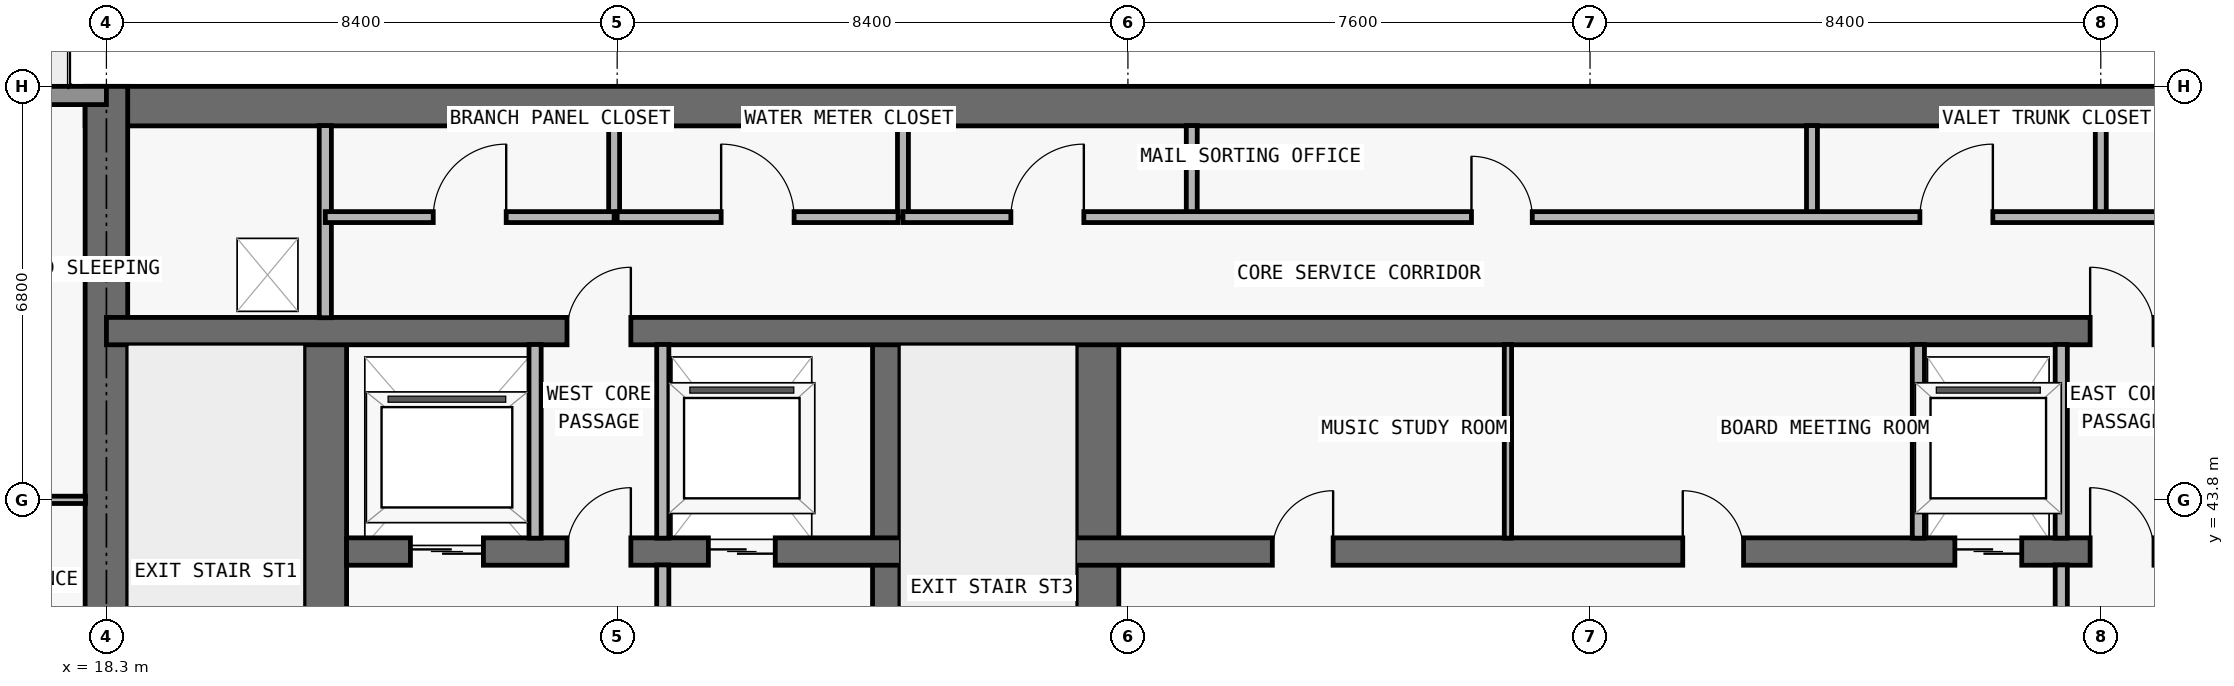
"""IFC4 building model, lengths in metres.
Left out: names, types, materials, properties, quantities, classifications, styles, units other than length and angle.
Written with IfcOpenShell. Run it as: python <this file> out.ifc"""

import sys

from ifc_helpers import new_model, si_unit, direction, frame, frame_2d, origin, place, context, subcontext, project, spatial, rectangle, extrude, element, fill, save


model = new_model("IFC4")
c1 = context("Model", 3, precision=1e-05, world=origin(), true_north=direction((0.0, 1.0)))
c2 = subcontext(c1, "Body", "Model", "MODEL_VIEW")
j1 = project(units=[si_unit("LENGTHUNIT", "METRE"), si_unit("PLANEANGLEUNIT", "RADIAN")], contexts=[c1])
p1 = place(None, origin())
s1 = spatial("IfcSite", under=j1, at=p1, CompositionType="ELEMENT")
p2 = place(p1, origin())
s2 = spatial("IfcBuilding", under=s1, at=p2, CompositionType="ELEMENT")
p3 = place(p2, frame((0.0, 0.0, 191.7)))
s3 = spatial("IfcBuildingStorey", under=s2, at=p3, CompositionType="ELEMENT", Elevation=191.7)
p4 = place(p3, frame((17.95, 50.275, 0.0), z_axis=(0.0, 0.0, 1.0), x_axis=(1.0, 0.0, 0.0)))
e1 = element("IfcWall", 1, at=p4, inside=s3, PredefinedType="SHEAR", context=c2, shape_type="SweptSolid", body=[
    extrude(rectangle(XDim=41.9, YDim=0.65, at=frame_2d((20.95, 0.0))), origin(), (0.0, 0.0, 1.0), 3.05),
])
p5 = place(p3, frame((18.3, 36.65, 0.0), z_axis=(0.0, 0.0, 1.0), x_axis=(0.0, 1.0, 0.0)))
e2 = element("IfcWall", 2, at=p5, inside=s3, PredefinedType="SHEAR", context=c2, shape_type="SweptSolid", body=[
    extrude(rectangle(XDim=13.95, YDim=0.7, at=frame_2d((6.975, 0.0))), origin(), (0.0, 0.0, 1.0), 3.05),
])
p6 = place(p3, frame((21.9, 37.0, 0.0), z_axis=(0.0, 0.0, 1.0), x_axis=(0.0, 1.0, 0.0)))
e3 = element("IfcWall", 3, at=p6, inside=s3, PredefinedType="SHEAR", context=c2, shape_type="SweptSolid", body=[
    extrude(rectangle(XDim=9.575, YDim=0.7, at=frame_2d((4.788, 0.0))), origin(), (0.0, 0.0, 1.0), 3.05),
])
p7 = place(p6, frame((0.55, 0.0, 0.0)))
e4 = element("IfcOpeningElement", 4, at=p7, cuts=e3, PredefinedType="OPENING", context=c2, shape_type="SweptSolid", body=[
    extrude(rectangle(XDim=1.1, YDim=2.15, at=frame_2d((0.55, 1.075))), frame((0.0, 0.36, 0.0), z_axis=(0.0, -1.0, 0.0), x_axis=(1.0, 0.0, 0.0)), (0.0, 0.0, 1.0), 0.72),
])
p8 = place(p3, frame((31.125, 37.0, 0.0), z_axis=(0.0, 0.0, 1.0), x_axis=(0.0, 1.0, 0.0)))
e5 = element("IfcWall", 5, at=p8, inside=s3, PredefinedType="SHEAR", context=c2, shape_type="SweptSolid", body=[
    extrude(rectangle(XDim=9.575, YDim=0.45, at=frame_2d((4.788, 0.0))), origin(), (0.0, 0.0, 1.0), 3.05),
])
p9 = place(p3, frame((34.6, 37.0, 0.0), z_axis=(0.0, 0.0, 1.0), x_axis=(0.0, 1.0, 0.0)))
e6 = element("IfcWall", 6, at=p9, inside=s3, PredefinedType="SHEAR", context=c2, shape_type="SweptSolid", body=[
    extrude(rectangle(XDim=9.575, YDim=0.7, at=frame_2d((4.788, 0.0))), origin(), (0.0, 0.0, 1.0), 3.05),
])
p10 = place(p3, frame((22.25, 42.95, 0.0), z_axis=(0.0, 0.0, 1.0), x_axis=(1.0, 0.0, 0.0)))
e7 = element("IfcWall", 7, at=p10, inside=s3, PredefinedType="SHEAR", context=c2, shape_type="SweptSolid", body=[
    extrude(rectangle(XDim=33.3, YDim=0.45, at=frame_2d((16.65, 0.0))), origin(), (0.0, 0.0, 1.0), 3.05),
])
p11 = place(p10, frame((1.05, 0.0, 0.0)))
e8 = element("IfcOpeningElement", 8, at=p11, cuts=e7, PredefinedType="OPENING", context=c2, shape_type="SweptSolid", body=[
    extrude(rectangle(XDim=1.2, YDim=2.2, at=frame_2d((0.6, 1.1))), frame((0.0, 0.235, 0.0), z_axis=(0.0, -1.0, 0.0), x_axis=(1.0, 0.0, 0.0)), (0.0, 0.0, 1.0), 0.47),
])
p12 = place(p10, frame((31.05, 0.0, 0.0)))
e9 = element("IfcOpeningElement", 9, at=p12, cuts=e7, PredefinedType="OPENING", context=c2, shape_type="SweptSolid", body=[
    extrude(rectangle(XDim=1.2, YDim=2.2, at=frame_2d((0.6, 1.1))), frame((0.0, 0.235, 0.0), z_axis=(0.0, -1.0, 0.0), x_axis=(1.0, 0.0, 0.0)), (0.0, 0.0, 1.0), 0.47),
])
p13 = place(p10, frame((26.45, 0.0, 0.0)))
e10 = element("IfcOpeningElement", 10, at=p13, cuts=e7, PredefinedType="OPENING", context=c2, shape_type="SweptSolid", body=[
    extrude(rectangle(XDim=1.1, YDim=2.2, at=frame_2d((0.55, 1.1))), frame((0.0, 0.235, 0.0), z_axis=(0.0, -1.0, 0.0), x_axis=(1.0, 0.0, 0.0)), (0.0, 0.0, 1.0), 0.47),
])
p14 = place(p10, frame((5.95, 0.0, 0.0)))
e11 = element("IfcOpeningElement", 11, at=p14, cuts=e7, PredefinedType="OPENING", context=c2, shape_type="SweptSolid", body=[
    extrude(rectangle(XDim=1.1, YDim=2.2, at=frame_2d((0.55, 1.1))), frame((0.0, 0.235, 0.0), z_axis=(0.0, -1.0, 0.0), x_axis=(1.0, 0.0, 0.0)), (0.0, 0.0, 1.0), 0.47),
])
p15 = place(p10, frame((3.625, 0.0, 0.0)))
e12 = element("IfcOpeningElement", 12, at=p15, cuts=e7, PredefinedType="OPENING", context=c2, shape_type="SweptSolid", body=[
    extrude(rectangle(XDim=1.05, YDim=2.15, at=frame_2d((0.525, 1.075))), frame((0.0, 0.235, 0.0), z_axis=(0.0, -1.0, 0.0), x_axis=(1.0, 0.0, 0.0)), (0.0, 0.0, 1.0), 0.47),
])
p16 = place(p10, frame((28.675, 0.0, 0.0)))
e13 = element("IfcOpeningElement", 13, at=p16, cuts=e7, PredefinedType="OPENING", context=c2, shape_type="SweptSolid", body=[
    extrude(rectangle(XDim=1.05, YDim=2.15, at=frame_2d((0.525, 1.075))), frame((0.0, 0.235, 0.0), z_axis=(0.0, -1.0, 0.0), x_axis=(1.0, 0.0, 0.0)), (0.0, 0.0, 1.0), 0.47),
])
p17 = place(p10, frame((15.225, 0.0, 0.0)))
e14 = element("IfcOpeningElement", 14, at=p17, cuts=e7, PredefinedType="OPENING", context=c2, shape_type="SweptSolid", body=[
    extrude(rectangle(XDim=1.0, YDim=2.2, at=frame_2d((0.5, 1.1))), frame((0.0, 0.235, 0.0), z_axis=(0.0, -1.0, 0.0), x_axis=(1.0, 0.0, 0.0)), (0.0, 0.0, 1.0), 0.47),
])
p18 = place(p10, frame((21.975, 0.0, 0.0)))
e15 = element("IfcOpeningElement", 15, at=p18, cuts=e7, PredefinedType="OPENING", context=c2, shape_type="SweptSolid", body=[
    extrude(rectangle(XDim=1.0, YDim=2.2, at=frame_2d((0.5, 1.1))), frame((0.0, 0.235, 0.0), z_axis=(0.0, -1.0, 0.0), x_axis=(1.0, 0.0, 0.0)), (0.0, 0.0, 1.0), 0.47),
])
p19 = place(p3, frame((18.3, 46.575, 0.0), z_axis=(0.0, 0.0, 1.0), x_axis=(1.0, 0.0, 0.0)))
e16 = element("IfcWall", 16, at=p19, inside=s3, PredefinedType="SHEAR", context=c2, shape_type="SweptSolid", body=[
    extrude(rectangle(XDim=41.2, YDim=0.45, at=frame_2d((20.6, 0.0))), origin(), (0.0, 0.0, 1.0), 3.05),
])
p20 = place(p19, frame((7.575, 0.0, 0.0)))
e17 = element("IfcOpeningElement", 17, at=p20, cuts=e16, PredefinedType="OPENING", context=c2, shape_type="SweptSolid", body=[
    extrude(rectangle(XDim=1.05, YDim=2.15, at=frame_2d((0.525, 1.075))), frame((0.0, 0.235, 0.0), z_axis=(0.0, -1.0, 0.0), x_axis=(1.0, 0.0, 0.0)), (0.0, 0.0, 1.0), 0.47),
])
p21 = place(p19, frame((32.625, 0.0, 0.0)))
e18 = element("IfcOpeningElement", 18, at=p21, cuts=e16, PredefinedType="OPENING", context=c2, shape_type="SweptSolid", body=[
    extrude(rectangle(XDim=1.05, YDim=2.15, at=frame_2d((0.525, 1.075))), frame((0.0, 0.235, 0.0), z_axis=(0.0, -1.0, 0.0), x_axis=(1.0, 0.0, 0.0)), (0.0, 0.0, 1.0), 0.47),
])
p22 = place(p3, frame((10.1, 50.45, 0.0), z_axis=(0.0, 0.0, 1.0), x_axis=(1.0, 0.0, 0.0)))
e19 = element("IfcWall", 19, at=p22, inside=s3, PredefinedType="STANDARD", context=c2, shape_type="SweptSolid", body=[
    extrude(rectangle(XDim=8.2, YDim=0.3, at=frame_2d((4.1, 0.0))), origin(), (0.0, 0.0, 1.0), 3.05),
])
p23 = place(p22, frame((3.1, 0.0, 0.0)))
e20 = element("IfcOpeningElement", 20, at=p23, cuts=e19, PredefinedType="OPENING", context=c2, shape_type="SweptSolid", body=[
    extrude(rectangle(XDim=2.0, YDim=2.3, at=frame_2d((1.0, 1.15))), frame((0.0, 0.16, 0.0), z_axis=(0.0, -1.0, 0.0), x_axis=(1.0, 0.0, 0.0)), (0.0, 0.0, 1.0), 0.32),
])
p24 = place(p3, frame((21.9, 46.795, 0.0), z_axis=(0.0, 0.0, 1.0), x_axis=(0.0, 1.0, 0.0)))
e21 = element("IfcWall", 21, at=p24, inside=s3, PredefinedType="PARTITIONING", context=c2, shape_type="SweptSolid", body=[
    extrude(rectangle(XDim=3.16, YDim=0.2, at=frame_2d((1.58, 0.0))), origin(), (0.0, 0.0, 1.0), 3.05),
])
p25 = place(p3, frame((25.35, 43.17, 0.0), z_axis=(0.0, 0.0, 1.0), x_axis=(0.0, 1.0, 0.0)))
e22 = element("IfcWall", 22, at=p25, inside=s3, PredefinedType="PARTITIONING", context=c2, shape_type="SweptSolid", body=[
    extrude(rectangle(XDim=3.185, YDim=0.2, at=frame_2d((1.593, 0.0))), origin(), (0.0, 0.0, 1.0), 3.05),
])
p26 = place(p3, frame((26.65, 48.45, 0.0), z_axis=(0.0, 0.0, 1.0), x_axis=(0.0, 1.0, 0.0)))
e23 = element("IfcWall", 23, at=p26, inside=s3, PredefinedType="PARTITIONING", context=c2, shape_type="SweptSolid", body=[
    extrude(rectangle(XDim=1.505, YDim=0.18, at=frame_2d((0.752, 0.0))), origin(), (0.0, 0.0, 1.0), 3.05),
])
p27 = place(p3, frame((27.45, 37.345, 0.0), z_axis=(0.0, 0.0, 1.0), x_axis=(0.0, 1.0, 0.0)))
e24 = element("IfcWall", 24, at=p27, inside=s3, PredefinedType="PARTITIONING", context=c2, shape_type="SweptSolid", body=[
    extrude(rectangle(XDim=5.385, YDim=0.2, at=frame_2d((2.692, 0.0))), origin(), (0.0, 0.0, 1.0), 3.05),
])
p28 = place(p3, frame((27.45, 43.17, 0.0), z_axis=(0.0, 0.0, 1.0), x_axis=(0.0, 1.0, 0.0)))
e25 = element("IfcWall", 25, at=p28, inside=s3, PredefinedType="PARTITIONING", context=c2, shape_type="SweptSolid", body=[
    extrude(rectangle(XDim=3.185, YDim=0.2, at=frame_2d((1.593, 0.0))), origin(), (0.0, 0.0, 1.0), 3.05),
])
for number, where, z_axis, x_axis in (
    (26, (31.4, 48.45, 0.0), (0.0, 0.0, 1.0), (0.0, 1.0, 0.0)),
    (27, (36.15, 48.45, 0.0), (0.0, 0.0, 1.0), (0.0, 1.0, 0.0)),
):
    element("IfcWall", number, at=place(p3, frame(where, z_axis=z_axis, x_axis=x_axis)), inside=s3, PredefinedType="PARTITIONING", context=c2, shape_type="SweptSolid", body=[
        extrude(rectangle(XDim=1.505, YDim=0.18, at=frame_2d((0.752, 0.0))), origin(), (0.0, 0.0, 1.0), 3.05),
    ])
p29 = place(p3, frame((41.35, 43.17, 0.0), z_axis=(0.0, 0.0, 1.0), x_axis=(0.0, 1.0, 0.0)))
e28 = element("IfcWall", 28, at=p29, inside=s3, PredefinedType="PARTITIONING", context=c2, shape_type="SweptSolid", body=[
    extrude(rectangle(XDim=3.185, YDim=0.12, at=frame_2d((1.593, 0.0))), origin(), (0.0, 0.0, 1.0), 3.05),
])
p30 = place(p3, frame((46.35, 48.45, 0.0), z_axis=(0.0, 0.0, 1.0), x_axis=(0.0, 1.0, 0.0)))
e29 = element("IfcWall", 29, at=p30, inside=s3, PredefinedType="PARTITIONING", context=c2, shape_type="SweptSolid", body=[
    extrude(rectangle(XDim=1.505, YDim=0.18, at=frame_2d((0.752, 0.0))), origin(), (0.0, 0.0, 1.0), 3.05),
])
p31 = place(p3, frame((48.1, 43.17, 0.0), z_axis=(0.0, 0.0, 1.0), x_axis=(0.0, 1.0, 0.0)))
e30 = element("IfcWall", 30, at=p31, inside=s3, PredefinedType="PARTITIONING", context=c2, shape_type="SweptSolid", body=[
    extrude(rectangle(XDim=3.185, YDim=0.2, at=frame_2d((1.593, 0.0))), origin(), (0.0, 0.0, 1.0), 3.05),
])
p32 = place(p3, frame((50.45, 37.345, 0.0), z_axis=(0.0, 0.0, 1.0), x_axis=(0.0, 1.0, 0.0)))
e31 = element("IfcWall", 31, at=p32, inside=s3, PredefinedType="PARTITIONING", context=c2, shape_type="SweptSolid", body=[
    extrude(rectangle(XDim=5.385, YDim=0.2, at=frame_2d((2.692, 0.0))), origin(), (0.0, 0.0, 1.0), 3.05),
])
p33 = place(p3, frame((50.45, 43.17, 0.0), z_axis=(0.0, 0.0, 1.0), x_axis=(0.0, 1.0, 0.0)))
e32 = element("IfcWall", 32, at=p33, inside=s3, PredefinedType="PARTITIONING", context=c2, shape_type="SweptSolid", body=[
    extrude(rectangle(XDim=3.185, YDim=0.2, at=frame_2d((1.593, 0.0))), origin(), (0.0, 0.0, 1.0), 3.05),
])
p34 = place(p3, frame((51.1, 48.45, 0.0), z_axis=(0.0, 0.0, 1.0), x_axis=(0.0, 1.0, 0.0)))
e33 = element("IfcWall", 33, at=p34, inside=s3, PredefinedType="PARTITIONING", context=c2, shape_type="SweptSolid", body=[
    extrude(rectangle(XDim=1.505, YDim=0.18, at=frame_2d((0.752, 0.0))), origin(), (0.0, 0.0, 1.0), 3.05),
])
p35 = place(p3, frame((6.395, 43.8, 0.0), z_axis=(0.0, 0.0, 1.0), x_axis=(1.0, 0.0, 0.0)))
e34 = element("IfcWall", 34, at=p35, inside=s3, PredefinedType="PARTITIONING", context=c2, shape_type="SweptSolid", body=[
    extrude(rectangle(XDim=11.56, YDim=0.12, at=frame_2d((5.78, 0.0))), origin(), (0.0, 0.0, 1.0), 2.418),
])
p36 = place(p35, frame((7.251, 0.0, 0.0)))
e35 = element("IfcOpeningElement", 35, at=p36, cuts=e34, PredefinedType="OPENING", context=c2, shape_type="SweptSolid", body=[
    extrude(rectangle(XDim=0.9, YDim=2.15, at=frame_2d((0.45, 1.075))), frame((0.0, 0.07, 0.0), z_axis=(0.0, -1.0, 0.0), x_axis=(1.0, 0.0, 0.0)), (0.0, 0.0, 1.0), 0.14),
])
p37 = place(p35, frame((9.982, 0.0, 0.0)))
e36 = element("IfcOpeningElement", 36, at=p37, cuts=e34, PredefinedType="OPENING", context=c2, shape_type="SweptSolid", body=[
    extrude(rectangle(XDim=0.85, YDim=2.1, at=frame_2d((0.425, 1.05))), frame((0.0, 0.07, 0.0), z_axis=(0.0, -1.0, 0.0), x_axis=(1.0, 0.0, 0.0)), (0.0, 0.0, 1.0), 0.14),
])
p38 = place(p3, frame((21.9, 48.45, 0.0), z_axis=(0.0, 0.0, 1.0), x_axis=(1.0, 0.0, 0.0)))
e37 = element("IfcWall", 37, at=p38, inside=s3, PredefinedType="PARTITIONING", context=c2, shape_type="SweptSolid", body=[
    extrude(rectangle(XDim=4.75, YDim=0.18, at=frame_2d((2.375, 0.0))), origin(), (0.0, 0.0, 1.0), 3.05),
])
p39 = place(p38, frame((1.775, 0.0, 0.0)))
e38 = element("IfcOpeningElement", 38, at=p39, cuts=e37, PredefinedType="OPENING", context=c2, shape_type="SweptSolid", body=[
    extrude(rectangle(XDim=1.2, YDim=2.2, at=frame_2d((0.6, 1.1))), frame((0.0, 0.1, 0.0), z_axis=(0.0, -1.0, 0.0), x_axis=(1.0, 0.0, 0.0)), (0.0, 0.0, 1.0), 0.2),
])
p40 = place(p3, frame((26.7, 48.45, 0.0), z_axis=(0.0, 0.0, 1.0), x_axis=(1.0, 0.0, 0.0)))
e39 = element("IfcWall", 39, at=p40, inside=s3, PredefinedType="PARTITIONING", context=c2, shape_type="SweptSolid", body=[
    extrude(rectangle(XDim=4.62, YDim=0.18, at=frame_2d((2.31, 0.0))), origin(), (0.0, 0.0, 1.0), 3.05),
])
p41 = place(p40, frame((1.71, 0.0, 0.0)))
e40 = element("IfcOpeningElement", 40, at=p41, cuts=e39, PredefinedType="OPENING", context=c2, shape_type="SweptSolid", body=[
    extrude(rectangle(XDim=1.2, YDim=2.2, at=frame_2d((0.6, 1.1))), frame((0.0, 0.1, 0.0), z_axis=(0.0, -1.0, 0.0), x_axis=(1.0, 0.0, 0.0)), (0.0, 0.0, 1.0), 0.2),
])
p42 = place(p3, frame((31.4, 48.45, 0.0), z_axis=(0.0, 0.0, 1.0), x_axis=(1.0, 0.0, 0.0)))
e41 = element("IfcWall", 41, at=p42, inside=s3, PredefinedType="PARTITIONING", context=c2, shape_type="SweptSolid", body=[
    extrude(rectangle(XDim=24.5, YDim=0.18, at=frame_2d((12.25, 0.0))), origin(), (0.0, 0.0, 1.0), 3.05),
])
p43 = place(p42, frame((1.775, 0.0, 0.0)))
e42 = element("IfcOpeningElement", 42, at=p43, cuts=e41, PredefinedType="OPENING", context=c2, shape_type="SweptSolid", body=[
    extrude(rectangle(XDim=1.2, YDim=2.2, at=frame_2d((0.6, 1.1))), frame((0.0, 0.1, 0.0), z_axis=(0.0, -1.0, 0.0), x_axis=(1.0, 0.0, 0.0)), (0.0, 0.0, 1.0), 0.2),
])
p44 = place(p42, frame((9.35, 0.0, 0.0)))
e43 = element("IfcOpeningElement", 43, at=p44, cuts=e41, PredefinedType="OPENING", context=c2, shape_type="SweptSolid", body=[
    extrude(rectangle(XDim=1.0, YDim=2.2, at=frame_2d((0.5, 1.1))), frame((0.0, 0.1, 0.0), z_axis=(0.0, -1.0, 0.0), x_axis=(1.0, 0.0, 0.0)), (0.0, 0.0, 1.0), 0.2),
])
p45 = place(p42, frame((16.725, 0.0, 0.0)))
e44 = element("IfcOpeningElement", 44, at=p45, cuts=e41, PredefinedType="OPENING", context=c2, shape_type="SweptSolid", body=[
    extrude(rectangle(XDim=1.2, YDim=2.2, at=frame_2d((0.6, 1.1))), frame((0.0, 0.1, 0.0), z_axis=(0.0, -1.0, 0.0), x_axis=(1.0, 0.0, 0.0)), (0.0, 0.0, 1.0), 0.2),
])
p46 = place(p42, frame((21.675, 0.0, 0.0)))
e45 = element("IfcOpeningElement", 45, at=p46, cuts=e41, PredefinedType="OPENING", context=c2, shape_type="SweptSolid", body=[
    extrude(rectangle(XDim=0.85, YDim=2.1, at=frame_2d((0.425, 1.05))), frame((0.0, 0.1, 0.0), z_axis=(0.0, -1.0, 0.0), x_axis=(1.0, 0.0, 0.0)), (0.0, 0.0, 1.0), 0.2),
])
p47 = place(p11, origin())
e46 = element("IfcDoor", 46, at=p47, inside=s3, OperationType="DOUBLE_DOOR_SLIDING", PredefinedType="DOOR", context=c2, shape_type="SweptSolid", body=[
    extrude(rectangle(XDim=1.2, YDim=2.2, at=frame_2d((0.6, 1.1))), frame((0.0, 0.025, 0.0), z_axis=(0.0, -1.0, 0.0), x_axis=(1.0, 0.0, 0.0)), (0.0, 0.0, 1.0), 0.05),
])
fill(e8, e46)
p48 = place(p13, origin())
e47 = element("IfcDoor", 47, at=p48, inside=s3, OperationType="DOUBLE_DOOR_SLIDING", PredefinedType="DOOR", context=c2, shape_type="SweptSolid", body=[
    extrude(rectangle(XDim=1.1, YDim=2.2, at=frame_2d((0.55, 1.1))), frame((0.0, 0.025, 0.0), z_axis=(0.0, -1.0, 0.0), x_axis=(1.0, 0.0, 0.0)), (0.0, 0.0, 1.0), 0.05),
])
fill(e10, e47)
p49 = place(p14, origin())
e48 = element("IfcDoor", 48, at=p49, inside=s3, OperationType="DOUBLE_DOOR_SLIDING", PredefinedType="DOOR", context=c2, shape_type="SweptSolid", body=[
    extrude(rectangle(XDim=1.1, YDim=2.2, at=frame_2d((0.55, 1.1))), frame((0.0, 0.025, 0.0), z_axis=(0.0, -1.0, 0.0), x_axis=(1.0, 0.0, 0.0)), (0.0, 0.0, 1.0), 0.05),
])
fill(e11, e48)
p50 = place(p15, origin())
e49 = element("IfcDoor", 49, at=p50, inside=s3, OperationType="SINGLE_SWING_RIGHT", PredefinedType="DOOR", context=c2, shape_type="SweptSolid", body=[
    extrude(rectangle(XDim=1.05, YDim=2.15, at=frame_2d((0.525, 1.075))), frame((0.0, 0.025, 0.0), z_axis=(0.0, -1.0, 0.0), x_axis=(1.0, 0.0, 0.0)), (0.0, 0.0, 1.0), 0.05),
])
fill(e12, e49)
p51 = place(p16, origin())
e50 = element("IfcDoor", 50, at=p51, inside=s3, OperationType="SINGLE_SWING_LEFT", PredefinedType="DOOR", context=c2, shape_type="SweptSolid", body=[
    extrude(rectangle(XDim=1.05, YDim=2.15, at=frame_2d((0.525, 1.075))), frame((0.0, 0.025, 0.0), z_axis=(0.0, -1.0, 0.0), x_axis=(1.0, 0.0, 0.0)), (0.0, 0.0, 1.0), 0.05),
])
fill(e13, e50)
p52 = place(p17, origin())
e51 = element("IfcDoor", 51, at=p52, inside=s3, OperationType="SINGLE_SWING_RIGHT", PredefinedType="DOOR", context=c2, shape_type="SweptSolid", body=[
    extrude(rectangle(XDim=1.0, YDim=2.2, at=frame_2d((0.5, 1.1))), frame((0.0, 0.025, 0.0), z_axis=(0.0, -1.0, 0.0), x_axis=(1.0, 0.0, 0.0)), (0.0, 0.0, 1.0), 0.05),
])
fill(e14, e51)
p53 = place(p18, origin())
e52 = element("IfcDoor", 52, at=p53, inside=s3, OperationType="SINGLE_SWING_LEFT", PredefinedType="DOOR", context=c2, shape_type="SweptSolid", body=[
    extrude(rectangle(XDim=1.0, YDim=2.2, at=frame_2d((0.5, 1.1))), frame((0.0, 0.025, 0.0), z_axis=(0.0, -1.0, 0.0), x_axis=(1.0, 0.0, 0.0)), (0.0, 0.0, 1.0), 0.05),
])
fill(e15, e52)
p54 = place(p20, origin())
e53 = element("IfcDoor", 53, at=p54, inside=s3, OperationType="SINGLE_SWING_RIGHT", PredefinedType="DOOR", context=c2, shape_type="SweptSolid", body=[
    extrude(rectangle(XDim=1.05, YDim=2.15, at=frame_2d((0.525, 1.075))), frame((0.0, 0.025, 0.0), z_axis=(0.0, -1.0, 0.0), x_axis=(1.0, 0.0, 0.0)), (0.0, 0.0, 1.0), 0.05),
])
fill(e17, e53)
p55 = place(p21, origin())
e54 = element("IfcDoor", 54, at=p55, inside=s3, OperationType="SINGLE_SWING_LEFT", PredefinedType="DOOR", context=c2, shape_type="SweptSolid", body=[
    extrude(rectangle(XDim=1.05, YDim=2.15, at=frame_2d((0.525, 1.075))), frame((0.0, 0.025, 0.0), z_axis=(0.0, -1.0, 0.0), x_axis=(1.0, 0.0, 0.0)), (0.0, 0.0, 1.0), 0.05),
])
fill(e18, e54)
p56 = place(p39, origin())
e55 = element("IfcDoor", 55, at=p56, inside=s3, OperationType="SINGLE_SWING_RIGHT", PredefinedType="DOOR", context=c2, shape_type="SweptSolid", body=[
    extrude(rectangle(XDim=1.2, YDim=2.2, at=frame_2d((0.6, 1.1))), frame((0.0, 0.025, 0.0), z_axis=(0.0, -1.0, 0.0), x_axis=(1.0, 0.0, 0.0)), (0.0, 0.0, 1.0), 0.05),
])
fill(e38, e55)
p57 = place(p41, origin())
e56 = element("IfcDoor", 56, at=p57, inside=s3, OperationType="SINGLE_SWING_LEFT", PredefinedType="DOOR", context=c2, shape_type="SweptSolid", body=[
    extrude(rectangle(XDim=1.2, YDim=2.2, at=frame_2d((0.6, 1.1))), frame((0.0, 0.025, 0.0), z_axis=(0.0, -1.0, 0.0), x_axis=(1.0, 0.0, 0.0)), (0.0, 0.0, 1.0), 0.05),
])
fill(e40, e56)
p58 = place(p43, origin())
e57 = element("IfcDoor", 57, at=p58, inside=s3, OperationType="SINGLE_SWING_RIGHT", PredefinedType="DOOR", context=c2, shape_type="SweptSolid", body=[
    extrude(rectangle(XDim=1.2, YDim=2.2, at=frame_2d((0.6, 1.1))), frame((0.0, 0.025, 0.0), z_axis=(0.0, -1.0, 0.0), x_axis=(1.0, 0.0, 0.0)), (0.0, 0.0, 1.0), 0.05),
])
fill(e42, e57)
p59 = place(p44, origin())
e58 = element("IfcDoor", 58, at=p59, inside=s3, OperationType="SINGLE_SWING_LEFT", PredefinedType="DOOR", context=c2, shape_type="SweptSolid", body=[
    extrude(rectangle(XDim=1.0, YDim=2.2, at=frame_2d((0.5, 1.1))), frame((0.0, 0.025, 0.0), z_axis=(0.0, -1.0, 0.0), x_axis=(1.0, 0.0, 0.0)), (0.0, 0.0, 1.0), 0.05),
])
fill(e43, e58)
p60 = place(p45, origin())
e59 = element("IfcDoor", 59, at=p60, inside=s3, OperationType="SINGLE_SWING_RIGHT", PredefinedType="DOOR", context=c2, shape_type="SweptSolid", body=[
    extrude(rectangle(XDim=1.2, YDim=2.2, at=frame_2d((0.6, 1.1))), frame((0.0, 0.025, 0.0), z_axis=(0.0, -1.0, 0.0), x_axis=(1.0, 0.0, 0.0)), (0.0, 0.0, 1.0), 0.05),
])
fill(e44, e59)
save(model, sys.argv[1])
